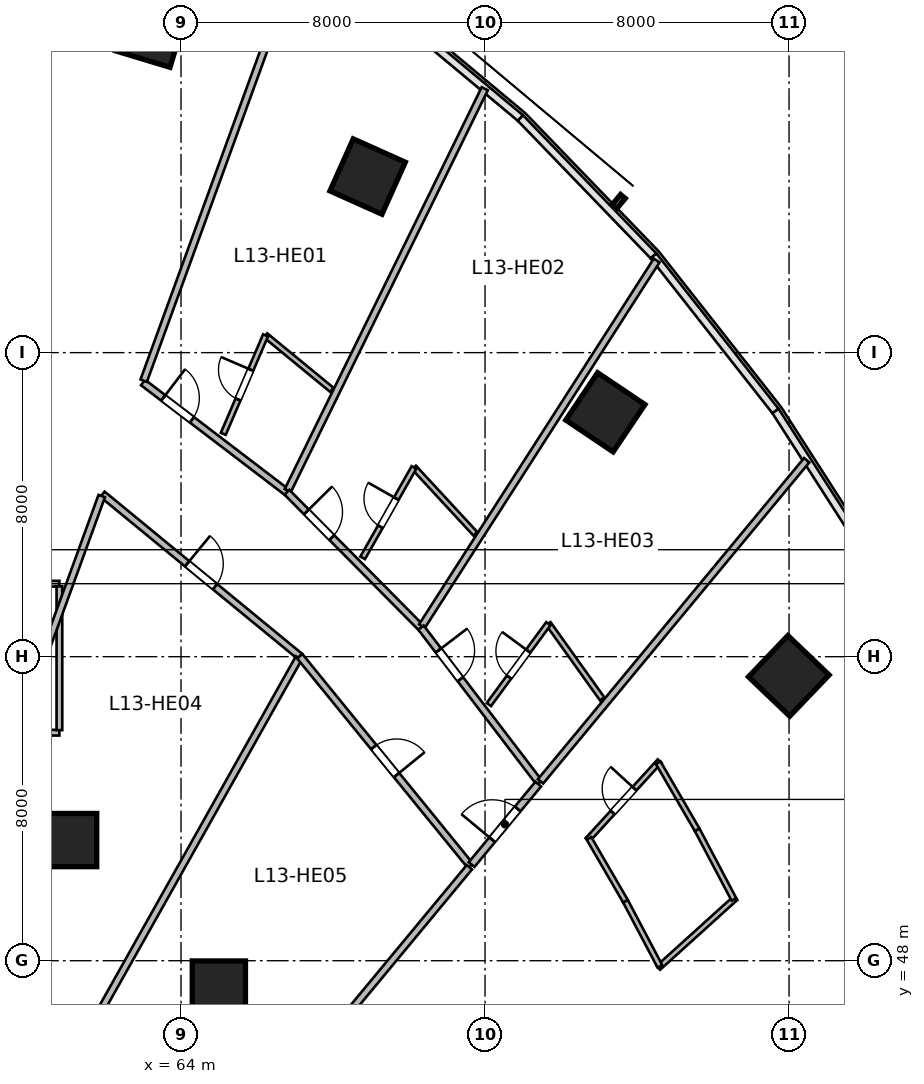
"""IFC4 building model, lengths in metres.
Left out: names, types, materials, properties, quantities, classifications, styles, units other than length and angle.
Written with IfcOpenShell. Run it as: python <this file> out.ifc"""

import sys

from ifc_helpers import new_model, si_unit, direction, frame, frame_2d, origin, origin_2d, place, context, subcontext, project, spatial, rectangle, circle, extrude, source, transform, mapped, element, fill, save


model = new_model("IFC4")
c1 = context("Model", 3, precision=1e-05, world=origin(), true_north=direction((0.0, 1.0)))
c2 = subcontext(c1, "Body", "Model", "MODEL_VIEW")
j1 = project(units=[si_unit("LENGTHUNIT", "METRE"), si_unit("PLANEANGLEUNIT", "RADIAN")], contexts=[c1])
p1 = place(None, origin())
s1 = spatial("IfcSite", under=j1, at=p1, CompositionType="ELEMENT")
p2 = place(p1, origin())
s2 = spatial("IfcBuilding", under=s1, at=p2, CompositionType="ELEMENT")
p3 = place(p2, frame((0.0, 0.0, 60.6)))
s3 = spatial("IfcBuildingStorey", under=s2, at=p3, CompositionType="ELEMENT", Elevation=60.6)
m1 = source(origin(), c2, "Body", "SweptSolid", [
    extrude(rectangle(XDim=1.5, YDim=1.5, at=origin_2d()), origin(), (0.0, 0.0, 1.0), 3.6),
])
p4 = place(p3, frame((63.209, 72.442, 0.0), z_axis=(0.0, 0.0, 1.0), x_axis=(0.288697611798, 0.957420330337, 0.0)))
e1 = element("IfcColumn", 1, at=p4, inside=s3, PredefinedType="COLUMN", context=c2, shape_type="MappedRepresentation", body=[
    mapped(m1, transform((0.0, 0.0, 0.0), scale=1.0)),
])
m2 = source(origin(), c2, "Body", "SweptSolid", [
    extrude(circle(Radius=0.7, at=origin_2d()), origin(), (0.0, 0.0, 1.0), 3.6),
])
p5 = place(p3, frame((61.082, 51.175, 0.0), z_axis=(0.0, 0.0, 1.0), x_axis=(0.409126902895, 0.912477494148, 0.0)))
e2 = element("IfcColumn", 2, at=p5, inside=s3, PredefinedType="COLUMN", context=c2, shape_type="MappedRepresentation", body=[
    mapped(m2, transform((0.0, 0.0, 0.0), scale=1.0)),
])
p6 = place(p3, frame((68.91, 68.633, 0.0), z_axis=(0.0, 0.0, 1.0), x_axis=(0.409126902895, 0.912477494148, 0.0)))
e3 = element("IfcColumn", 3, at=p6, inside=s3, PredefinedType="COLUMN", context=c2, shape_type="MappedRepresentation", body=[
    mapped(m1, transform((0.0, 0.0, 0.0), scale=1.0)),
])
p7 = place(p3, frame((64.996, 47.294, 0.0), z_axis=(0.0, 0.0, 1.0), x_axis=(0.55774510898, 0.830012285095, 0.0)))
e4 = element("IfcColumn", 4, at=p7, inside=s3, PredefinedType="COLUMN", context=c2, shape_type="MappedRepresentation", body=[
    mapped(m2, transform((0.0, 0.0, 0.0), scale=1.0)),
])
for number, where, z_axis, x_axis in (
    (5, (75.167, 62.43, 0.0), (0.0, 0.0, 1.0), (0.558, 0.83, 0.0)),
    (6, (79.993, 55.494, 0.0), (0.0, 0.0, 1.0), (0.691, 0.723, 0.0)),
):
    element("IfcColumn", number, at=place(p3, frame(where, z_axis=z_axis, x_axis=x_axis)), inside=s3, PredefinedType="COLUMN", context=c2, shape_type="MappedRepresentation", body=[
        mapped(m1, transform((0.0, 0.0, 0.0), scale=1.0)),
    ])
m3 = source(origin(), c2, "Body", "SweptSolid", [
    extrude(rectangle(XDim=6.6, YDim=0.15, at=frame_2d((3.3, 0.0))), origin(), (0.0, 0.0, 1.0), 2.803),
])
p8 = place(p3, frame((54.2, 54.0, 0.0), z_axis=(0.0, 0.0, 1.0), x_axis=(1.0, 0.0, 0.0)))
e7 = element("IfcWall", 7, at=p8, inside=s3, PredefinedType="PARTITIONING", context=c2, shape_type="MappedRepresentation", body=[
    mapped(m3, transform((0.0, 0.0, 0.0), scale=1.0)),
])
m4 = source(origin(), c2, "Body", "SweptSolid", [
    extrude(rectangle(XDim=6.6, YDim=0.15, at=frame_2d((3.3, 0.0))), origin(), (0.0, 0.0, 1.0), 3.36),
])
p9 = place(p3, frame((54.2, 57.92, 0.0), z_axis=(0.0, 0.0, 1.0), x_axis=(1.0, 0.0, 0.0)))
e8 = element("IfcWall", 8, at=p9, inside=s3, PredefinedType="PARTITIONING", context=c2, shape_type="MappedRepresentation", body=[
    mapped(m4, transform((0.0, 0.0, 0.0), scale=1.0)),
])
p10 = place(p9, frame((2.825, 0.0, 0.0)))
e9 = element("IfcOpeningElement", 9, at=p10, cuts=e8, PredefinedType="OPENING", context=c2, shape_type="SweptSolid", body=[
    extrude(rectangle(XDim=0.95, YDim=2.1, at=frame_2d((0.475, 1.05))), frame((0.0, 0.085, 0.0), z_axis=(0.0, -1.0, 0.0), x_axis=(1.0, 0.0, 0.0)), (0.0, 0.0, 1.0), 0.17),
])
m5 = source(origin(), c2, "Body", "SweptSolid", [
    extrude(rectangle(XDim=3.785, YDim=0.15, at=frame_2d((1.893, 0.0))), origin(), (0.0, 0.0, 1.0), 3.36),
])
p11 = place(p3, frame((60.8, 54.067, 0.0), z_axis=(0.0, 0.0, 1.0), x_axis=(0.0, 1.0, 0.0)))
e10 = element("IfcWall", 10, at=p11, inside=s3, PredefinedType="PARTITIONING", context=c2, shape_type="MappedRepresentation", body=[
    mapped(m5, transform((0.0, 0.0, 0.0), scale=1.0)),
])
m6 = source(origin(), c2, "Body", "SweptSolid", [
    extrude(rectangle(XDim=4.762, YDim=0.18, at=frame_2d((2.381, 0.0))), origin(), (0.0, 0.0, 1.0), 3.36),
])
p12 = place(p3, frame((63.001, 63.214, 0.0), z_axis=(0.0, 0.0, 1.0), x_axis=(0.795070295872, -0.60651729128, 0.0)))
e11 = element("IfcWall", 11, at=p12, inside=s3, PredefinedType="PLUMBINGWALL", context=c2, shape_type="MappedRepresentation", body=[
    mapped(m6, transform((0.0, 0.0, 0.0), scale=1.0)),
])
p13 = place(p12, frame((0.668, 0.0, 0.0)))
e12 = element("IfcOpeningElement", 12, at=p13, cuts=e11, PredefinedType="OPENING", context=c2, shape_type="SweptSolid", body=[
    extrude(rectangle(XDim=0.95, YDim=2.15, at=frame_2d((0.475, 1.075))), frame((0.0, 0.1, 0.0), z_axis=(0.0, -1.0, 0.0), x_axis=(1.0, 0.0, 0.0)), (0.0, 0.0, 1.0), 0.2),
])
m7 = source(origin(), c2, "Body", "SweptSolid", [
    extrude(rectangle(XDim=12.088, YDim=0.18, at=frame_2d((6.044, 0.0))), origin(), (0.0, 0.0, 1.0), 3.36),
])
p14 = place(p3, frame((63.019, 63.262, 0.0), z_axis=(0.0, 0.0, 1.0), x_axis=(0.34203007529, 0.939689005787, 0.0)))
e13 = element("IfcWall", 13, at=p14, inside=s3, PredefinedType="PLUMBINGWALL", context=c2, shape_type="MappedRepresentation", body=[
    mapped(m7, transform((0.0, 0.0, 0.0), scale=1.0)),
])
m8 = source(origin(), c2, "Body", "SweptSolid", [
    extrude(rectangle(XDim=11.775, YDim=0.18, at=frame_2d((5.887, 0.0))), origin(), (0.0, 0.0, 1.0), 3.36),
])
p15 = place(p3, frame((66.81, 60.371, 0.0), z_axis=(0.0, 0.0, 1.0), x_axis=(0.4401500056, 0.897924257702, 0.0)))
e14 = element("IfcWall", 14, at=p15, inside=s3, PredefinedType="PLUMBINGWALL", context=c2, shape_type="MappedRepresentation", body=[
    mapped(m8, transform((0.0, 0.0, 0.0), scale=1.0)),
])
m9 = source(origin(), c2, "Body", "SweptSolid", [
    extrude(rectangle(XDim=2.26, YDim=0.14, at=frame_2d((1.13, 0.0))), origin(), (0.0, 0.0, 1.0), 3.36),
])
p16 = place(p3, frame((66.224, 64.455, 0.0), z_axis=(0.0, 0.0, 1.0), x_axis=(0.772646789219, -0.634836151388, 0.0)))
e15 = element("IfcWall", 15, at=p16, inside=s3, PredefinedType="PARTITIONING", context=c2, shape_type="MappedRepresentation", body=[
    mapped(m9, transform((0.0, 0.0, 0.0), scale=1.0)),
])
m10 = source(origin(), c2, "Body", "SweptSolid", [
    extrude(rectangle(XDim=2.819, YDim=0.14, at=frame_2d((1.409, 0.0))), origin(), (0.0, 0.0, 1.0), 3.36),
])
p17 = place(p3, frame((65.112, 61.864, 0.0), z_axis=(0.0, 0.0, 1.0), x_axis=(0.394420979357, 0.918929861874, 0.0)))
e16 = element("IfcWall", 16, at=p17, inside=s3, PredefinedType="PARTITIONING", context=c2, shape_type="MappedRepresentation", body=[
    mapped(m10, transform((0.0, 0.0, 0.0), scale=1.0)),
])
p18 = place(p17, frame((0.984, 0.0, 0.0)))
e17 = element("IfcOpeningElement", 17, at=p18, cuts=e16, PredefinedType="OPENING", context=c2, shape_type="SweptSolid", body=[
    extrude(rectangle(XDim=0.85, YDim=2.05, at=frame_2d((0.425, 1.025))), frame((0.0, 0.08, 0.0), z_axis=(0.0, -1.0, 0.0), x_axis=(1.0, 0.0, 0.0)), (0.0, 0.0, 1.0), 0.16),
])
m11 = source(origin(), c2, "Body", "SweptSolid", [
    extrude(rectangle(XDim=5.012, YDim=0.18, at=frame_2d((2.506, 0.0))), origin(), (0.0, 0.0, 1.0), 3.36),
])
p19 = place(p3, frame((66.788, 60.326, 0.0), z_axis=(0.0, 0.0, 1.0), x_axis=(0.703664626435, -0.710532260707, 0.0)))
e18 = element("IfcWall", 18, at=p19, inside=s3, PredefinedType="PLUMBINGWALL", context=c2, shape_type="MappedRepresentation", body=[
    mapped(m11, transform((0.0, 0.0, 0.0), scale=1.0)),
])
p20 = place(p19, frame((0.728, 0.0, 0.0)))
e19 = element("IfcOpeningElement", 19, at=p20, cuts=e18, PredefinedType="OPENING", context=c2, shape_type="SweptSolid", body=[
    extrude(rectangle(XDim=0.95, YDim=2.15, at=frame_2d((0.475, 1.075))), frame((0.0, 0.1, 0.0), z_axis=(0.0, -1.0, 0.0), x_axis=(1.0, 0.0, 0.0)), (0.0, 0.0, 1.0), 0.2),
])
m12 = source(origin(), c2, "Body", "SweptSolid", [
    extrude(rectangle(XDim=11.432, YDim=0.18, at=frame_2d((5.716, 0.0))), origin(), (0.0, 0.0, 1.0), 3.36),
])
p21 = place(p3, frame((70.341, 56.805, 0.0), z_axis=(0.0, 0.0, 1.0), x_axis=(0.540196183124, 0.841539115988, 0.0)))
e20 = element("IfcWall", 20, at=p21, inside=s3, PredefinedType="PLUMBINGWALL", context=c2, shape_type="MappedRepresentation", body=[
    mapped(m12, transform((0.0, 0.0, 0.0), scale=1.0)),
])
m13 = source(origin(), c2, "Body", "SweptSolid", [
    extrude(rectangle(XDim=2.38, YDim=0.14, at=frame_2d((1.19, 0.0))), origin(), (0.0, 0.0, 1.0), 3.36),
])
p22 = place(p3, frame((70.131, 60.979, 0.0), z_axis=(0.0, 0.0, 1.0), x_axis=(0.679084816758, -0.734059814762, 0.0)))
e21 = element("IfcWall", 21, at=p22, inside=s3, PredefinedType="PARTITIONING", context=c2, shape_type="MappedRepresentation", body=[
    mapped(m13, transform((0.0, 0.0, 0.0), scale=1.0)),
])
m14 = source(origin(), c2, "Body", "SweptSolid", [
    extrude(rectangle(XDim=2.735, YDim=0.14, at=frame_2d((1.367, 0.0))), origin(), (0.0, 0.0, 1.0), 3.36),
])
p23 = place(p3, frame((68.781, 58.6, 0.0), z_axis=(0.0, 0.0, 1.0), x_axis=(0.493694940578, 0.869635156631, 0.0)))
e22 = element("IfcWall", 22, at=p23, inside=s3, PredefinedType="PARTITIONING", context=c2, shape_type="MappedRepresentation", body=[
    mapped(m14, transform((0.0, 0.0, 0.0), scale=1.0)),
])
p24 = place(p23, frame((0.942, 0.0, 0.0)))
e23 = element("IfcOpeningElement", 23, at=p24, cuts=e22, PredefinedType="OPENING", context=c2, shape_type="SweptSolid", body=[
    extrude(rectangle(XDim=0.85, YDim=2.05, at=frame_2d((0.425, 1.025))), frame((0.0, 0.08, 0.0), z_axis=(0.0, -1.0, 0.0), x_axis=(1.0, 0.0, 0.0)), (0.0, 0.0, 1.0), 0.16),
])
m15 = source(origin(), c2, "Body", "SweptSolid", [
    extrude(rectangle(XDim=5.135, YDim=0.18, at=frame_2d((2.567, 0.0))), origin(), (0.0, 0.0, 1.0), 3.36),
])
p25 = place(p3, frame((70.315, 56.764, 0.0), z_axis=(0.0, 0.0, 1.0), x_axis=(0.606802199649, -0.794852873494, 0.0)))
e24 = element("IfcWall", 24, at=p25, inside=s3, PredefinedType="PLUMBINGWALL", context=c2, shape_type="MappedRepresentation", body=[
    mapped(m15, transform((0.0, 0.0, 0.0), scale=1.0)),
])
p26 = place(p25, frame((0.757, 0.0, 0.0)))
e25 = element("IfcOpeningElement", 25, at=p26, cuts=e24, PredefinedType="OPENING", context=c2, shape_type="SweptSolid", body=[
    extrude(rectangle(XDim=0.95, YDim=2.15, at=frame_2d((0.475, 1.075))), frame((0.0, 0.1, 0.0), z_axis=(0.0, -1.0, 0.0), x_axis=(1.0, 0.0, 0.0)), (0.0, 0.0, 1.0), 0.2),
])
m16 = source(origin(), c2, "Body", "SweptSolid", [
    extrude(rectangle(XDim=10.975, YDim=0.18, at=frame_2d((5.487, 0.0))), origin(), (0.0, 0.0, 1.0), 3.36),
])
p27 = place(p3, frame((73.46, 52.719, 0.0), z_axis=(0.0, 0.0, 1.0), x_axis=(0.638125265812, 0.769932558821, 0.0)))
e26 = element("IfcWall", 26, at=p27, inside=s3, PredefinedType="PLUMBINGWALL", context=c2, shape_type="MappedRepresentation", body=[
    mapped(m16, transform((0.0, 0.0, 0.0), scale=1.0)),
])
m17 = source(origin(), c2, "Body", "SweptSolid", [
    extrude(rectangle(XDim=2.437, YDim=0.14, at=frame_2d((1.218, 0.0))), origin(), (0.0, 0.0, 1.0), 3.36),
])
p28 = place(p3, frame((73.667, 56.868, 0.0), z_axis=(0.0, 0.0, 1.0), x_axis=(0.581797219134, -0.813333877204, 0.0)))
e27 = element("IfcWall", 27, at=p28, inside=s3, PredefinedType="PARTITIONING", context=c2, shape_type="MappedRepresentation", body=[
    mapped(m17, transform((0.0, 0.0, 0.0), scale=1.0)),
])
m18 = source(origin(), c2, "Body", "SweptSolid", [
    extrude(rectangle(XDim=2.642, YDim=0.14, at=frame_2d((1.321, 0.0))), origin(), (0.0, 0.0, 1.0), 3.36),
])
p29 = place(p3, frame((72.101, 54.741, 0.0), z_axis=(0.0, 0.0, 1.0), x_axis=(0.592789122423, 0.805357719487, 0.0)))
e28 = element("IfcWall", 28, at=p29, inside=s3, PredefinedType="PARTITIONING", context=c2, shape_type="MappedRepresentation", body=[
    mapped(m18, transform((0.0, 0.0, 0.0), scale=1.0)),
])
p30 = place(p29, frame((0.896, 0.0, 0.0)))
e29 = element("IfcOpeningElement", 29, at=p30, cuts=e28, PredefinedType="OPENING", context=c2, shape_type="SweptSolid", body=[
    extrude(rectangle(XDim=0.85, YDim=2.05, at=frame_2d((0.425, 1.025))), frame((0.0, 0.08, 0.0), z_axis=(0.0, -1.0, 0.0), x_axis=(1.0, 0.0, 0.0)), (0.0, 0.0, 1.0), 0.16),
])
m19 = source(origin(), c2, "Body", "SweptSolid", [
    extrude(rectangle(XDim=6.721, YDim=0.18, at=frame_2d((3.361, 0.0))), origin(), (0.0, 0.0, 1.0), 3.36),
])
p31 = place(p3, frame((61.931, 60.275, 0.0), z_axis=(0.0, 0.0, 1.0), x_axis=(0.772828051199, -0.63461547671, 0.0)))
e30 = element("IfcWall", 30, at=p31, inside=s3, PredefinedType="PLUMBINGWALL", context=c2, shape_type="MappedRepresentation", body=[
    mapped(m19, transform((0.0, 0.0, 0.0), scale=1.0)),
])
p32 = place(p31, frame((2.885, 0.0, 0.0)))
e31 = element("IfcOpeningElement", 31, at=p32, cuts=e30, PredefinedType="OPENING", context=c2, shape_type="SweptSolid", body=[
    extrude(rectangle(XDim=0.95, YDim=2.15, at=frame_2d((0.475, 1.075))), frame((0.0, 0.1, 0.0), z_axis=(0.0, -1.0, 0.0), x_axis=(1.0, 0.0, 0.0)), (0.0, 0.0, 1.0), 0.2),
])
m20 = source(origin(), c2, "Body", "SweptSolid", [
    extrude(rectangle(XDim=12.196, YDim=0.18, at=frame_2d((6.098, 0.0))), origin(), (0.0, 0.0, 1.0), 3.36),
])
p33 = place(p3, frame((57.742, 48.766, 0.0), z_axis=(0.0, 0.0, 1.0), x_axis=(0.342022711534, 0.939691686031, 0.0)))
e32 = element("IfcWall", 32, at=p33, inside=s3, PredefinedType="PLUMBINGWALL", context=c2, shape_type="MappedRepresentation", body=[
    mapped(m20, transform((0.0, 0.0, 0.0), scale=1.0)),
])
m21 = source(origin(), c2, "Body", "SweptSolid", [
    extrude(rectangle(XDim=11.67, YDim=0.18, at=frame_2d((5.835, 0.0))), origin(), (0.0, 0.0, 1.0), 3.36),
])
p34 = place(p3, frame((61.381, 45.795, 0.0), z_axis=(0.0, 0.0, 1.0), x_axis=(0.490156946222, 0.871634193954, 0.0)))
e33 = element("IfcWall", 33, at=p34, inside=s3, PredefinedType="PLUMBINGWALL", context=c2, shape_type="MappedRepresentation", body=[
    mapped(m21, transform((0.0, 0.0, 0.0), scale=1.0)),
])
m22 = source(origin(), c2, "Body", "SweptSolid", [
    extrude(rectangle(XDim=7.113, YDim=0.18, at=frame_2d((3.556, 0.0))), origin(), (0.0, 0.0, 1.0), 3.36),
])
p35 = place(p3, frame((67.126, 56.01, 0.0), z_axis=(0.0, 0.0, 1.0), x_axis=(0.63149032532, -0.775383755974, 0.0)))
e34 = element("IfcWall", 34, at=p35, inside=s3, PredefinedType="PLUMBINGWALL", context=c2, shape_type="MappedRepresentation", body=[
    mapped(m22, transform((0.0, 0.0, 0.0), scale=1.0)),
])
p36 = place(p35, frame((3.081, 0.0, 0.0)))
e35 = element("IfcOpeningElement", 35, at=p36, cuts=e34, PredefinedType="OPENING", context=c2, shape_type="SweptSolid", body=[
    extrude(rectangle(XDim=0.95, YDim=2.15, at=frame_2d((0.475, 1.075))), frame((0.0, 0.1, 0.0), z_axis=(0.0, -1.0, 0.0), x_axis=(1.0, 0.0, 0.0)), (0.0, 0.0, 1.0), 0.2),
])
m23 = source(origin(), c2, "Body", "SweptSolid", [
    extrude(rectangle(XDim=11.053, YDim=0.18, at=frame_2d((5.527, 0.0))), origin(), (0.0, 0.0, 1.0), 3.36),
])
p37 = place(p3, frame((64.534, 41.949, 0.0), z_axis=(0.0, 0.0, 1.0), x_axis=(0.638131235571, 0.769927611005, 0.0)))
e36 = element("IfcWall", 36, at=p37, inside=s3, PredefinedType="PLUMBINGWALL", context=c2, shape_type="MappedRepresentation", body=[
    mapped(m23, transform((0.0, 0.0, 0.0), scale=1.0)),
])
m24 = source(origin(), c2, "Body", "SweptSolid", [
    extrude(rectangle(XDim=2.748, YDim=0.195, at=frame_2d((1.374, 0.0))), origin(), (0.0, 0.0, 1.0), 3.36),
])
p38 = place(p3, frame((71.647, 50.531, 0.0), z_axis=(0.0, 0.0, 1.0), x_axis=(0.638111168284, 0.769944242729, 0.0)))
e37 = element("IfcWall", 37, at=p38, inside=s3, PredefinedType="PARTITIONING", context=c2, shape_type="MappedRepresentation", body=[
    mapped(m24, transform((0.0, 0.0, 0.0), scale=1.0)),
])
p39 = place(p38, frame((0.849, 0.0, 0.0)))
e38 = element("IfcOpeningElement", 38, at=p39, cuts=e37, PredefinedType="OPENING", context=c2, shape_type="SweptSolid", body=[
    extrude(rectangle(XDim=1.05, YDim=2.15, at=frame_2d((0.525, 1.075))), frame((0.0, 0.107, 0.0), z_axis=(0.0, -1.0, 0.0), x_axis=(1.0, 0.0, 0.0)), (0.0, 0.0, 1.0), 0.215),
])
m25 = source(origin(), c2, "Body", "SweptSolid", [
    extrude(rectangle(XDim=2.812, YDim=0.14, at=frame_2d((1.406, 0.0))), origin(), (0.0, 0.0, 1.0), 3.36),
])
p40 = place(p3, frame((74.697, 51.177, 0.0), z_axis=(0.0, 0.0, 1.0), x_axis=(0.675119025852, 0.737708818527, 0.0)))
e39 = element("IfcWall", 39, at=p40, inside=s3, PredefinedType="PARTITIONING", context=c2, shape_type="MappedRepresentation", body=[
    mapped(m25, transform((0.0, 0.0, 0.0), scale=1.0)),
])
p41 = place(p40, frame((0.981, 0.0, 0.0)))
e40 = element("IfcOpeningElement", 40, at=p41, cuts=e39, PredefinedType="OPENING", context=c2, shape_type="SweptSolid", body=[
    extrude(rectangle(XDim=0.85, YDim=2.05, at=frame_2d((0.425, 1.025))), frame((0.0, 0.08, 0.0), z_axis=(0.0, -1.0, 0.0), x_axis=(1.0, 0.0, 0.0)), (0.0, 0.0, 1.0), 0.16),
])
m26 = source(origin(), c2, "Body", "SweptSolid", [
    extrude(rectangle(XDim=2.738, YDim=0.14, at=frame_2d((1.369, 0.0))), origin(), (0.0, 0.0, 1.0), 3.36),
])
p42 = place(p3, frame((76.56, 47.814, 0.0), z_axis=(0.0, 0.0, 1.0), x_axis=(0.741873676582, 0.670539669218, 0.0)))
e41 = element("IfcWall", 41, at=p42, inside=s3, PredefinedType="PARTITIONING", context=c2, shape_type="MappedRepresentation", body=[
    mapped(m26, transform((0.0, 0.0, 0.0), scale=1.0)),
])
m27 = source(origin(), c2, "Body", "SweptSolid", [
    extrude(rectangle(XDim=1.914, YDim=0.14, at=frame_2d((0.957, 0.0))), origin(), (0.0, 0.0, 1.0), 3.36),
])
p43 = place(p3, frame((74.736, 51.219, 0.0), z_axis=(0.0, 0.0, 1.0), x_axis=(0.502347790612, -0.864665656347, 0.0)))
e42 = element("IfcWall", 42, at=p43, inside=s3, PredefinedType="PARTITIONING", context=c2, shape_type="MappedRepresentation", body=[
    mapped(m27, transform((0.0, 0.0, 0.0), scale=1.0)),
])
m28 = source(origin(), c2, "Body", "SweptSolid", [
    extrude(rectangle(XDim=2.045, YDim=0.14, at=frame_2d((1.022, 0.0))), origin(), (0.0, 0.0, 1.0), 3.36),
])
p44 = place(p3, frame((76.557, 53.209, 0.0), z_axis=(0.0, 0.0, 1.0), x_axis=(0.5023112139, -0.864686905411, 0.0)))
e43 = element("IfcWall", 43, at=p44, inside=s3, PredefinedType="PARTITIONING", context=c2, shape_type="MappedRepresentation", body=[
    mapped(m28, transform((0.0, 0.0, 0.0), scale=1.0)),
])
m29 = source(origin(), c2, "Body", "SweptSolid", [
    extrude(rectangle(XDim=1.936, YDim=0.14, at=frame_2d((0.968, 0.0))), origin(), (0.0, 0.0, 1.0), 3.36),
])
p45 = place(p3, frame((75.697, 49.563, 0.0), z_axis=(0.0, 0.0, 1.0), x_axis=(0.467174971862, -0.884164886017, 0.0)))
e44 = element("IfcWall", 44, at=p45, inside=s3, PredefinedType="PARTITIONING", context=c2, shape_type="MappedRepresentation", body=[
    mapped(m29, transform((0.0, 0.0, 0.0), scale=1.0)),
])
m30 = source(origin(), c2, "Body", "SweptSolid", [
    extrude(rectangle(XDim=2.068, YDim=0.14, at=frame_2d((1.034, 0.0))), origin(), (0.0, 0.0, 1.0), 3.36),
])
p46 = place(p3, frame((77.584, 51.441, 0.0), z_axis=(0.0, 0.0, 1.0), x_axis=(0.467215057643, -0.884143704333, 0.0)))
e45 = element("IfcWall", 45, at=p46, inside=s3, PredefinedType="PARTITIONING", context=c2, shape_type="MappedRepresentation", body=[
    mapped(m30, transform((0.0, 0.0, 0.0), scale=1.0)),
])
m31 = source(origin(), c2, "Body", "SweptSolid", [
    extrude(rectangle(XDim=0.95, YDim=2.15, at=frame_2d((0.475, 1.075))), frame((0.0, 0.025, 0.0), z_axis=(0.0, -1.0, 0.0), x_axis=(1.0, 0.0, 0.0)), (0.0, 0.0, 1.0), 0.05),
])
p47 = place(p13, origin())
e46 = element("IfcDoor", 46, at=p47, inside=s3, OperationType="SINGLE_SWING_LEFT", PredefinedType="DOOR", context=c2, shape_type="MappedRepresentation", body=[
    mapped(m31, transform((0.0, 0.0, 0.0), scale=1.0)),
])
fill(e12, e46)
m32 = source(origin(), c2, "Body", "SweptSolid", [
    extrude(rectangle(XDim=0.85, YDim=2.05, at=frame_2d((0.425, 1.025))), frame((0.0, 0.025, 0.0), z_axis=(0.0, -1.0, 0.0), x_axis=(1.0, 0.0, 0.0)), (0.0, 0.0, 1.0), 0.05),
])
p48 = place(p18, origin())
e47 = element("IfcDoor", 47, at=p48, inside=s3, OperationType="SINGLE_SWING_RIGHT", PredefinedType="DOOR", context=c2, shape_type="MappedRepresentation", body=[
    mapped(m32, transform((0.0, 0.0, 0.0), scale=1.0)),
])
fill(e17, e47)
p49 = place(p20, origin())
e48 = element("IfcDoor", 48, at=p49, inside=s3, OperationType="SINGLE_SWING_LEFT", PredefinedType="DOOR", context=c2, shape_type="MappedRepresentation", body=[
    mapped(m31, transform((0.0, 0.0, 0.0), scale=1.0)),
])
fill(e19, e48)
p50 = place(p24, origin())
e49 = element("IfcDoor", 49, at=p50, inside=s3, OperationType="SINGLE_SWING_RIGHT", PredefinedType="DOOR", context=c2, shape_type="MappedRepresentation", body=[
    mapped(m32, transform((0.0, 0.0, 0.0), scale=1.0)),
])
fill(e23, e49)
p51 = place(p26, origin())
e50 = element("IfcDoor", 50, at=p51, inside=s3, OperationType="SINGLE_SWING_LEFT", PredefinedType="DOOR", context=c2, shape_type="MappedRepresentation", body=[
    mapped(m31, transform((0.0, 0.0, 0.0), scale=1.0)),
])
fill(e25, e50)
p52 = place(p30, origin())
e51 = element("IfcDoor", 51, at=p52, inside=s3, OperationType="SINGLE_SWING_RIGHT", PredefinedType="DOOR", context=c2, shape_type="MappedRepresentation", body=[
    mapped(m32, transform((0.0, 0.0, 0.0), scale=1.0)),
])
fill(e29, e51)
p53 = place(p32, origin())
e52 = element("IfcDoor", 52, at=p53, inside=s3, OperationType="SINGLE_SWING_LEFT", PredefinedType="DOOR", context=c2, shape_type="MappedRepresentation", body=[
    mapped(m31, transform((0.0, 0.0, 0.0), scale=1.0)),
])
fill(e31, e52)
p54 = place(p36, origin())
e53 = element("IfcDoor", 53, at=p54, inside=s3, OperationType="SINGLE_SWING_RIGHT", PredefinedType="DOOR", context=c2, shape_type="MappedRepresentation", body=[
    mapped(m31, transform((0.0, 0.0, 0.0), scale=1.0)),
])
fill(e35, e53)
m33 = source(origin(), c2, "Body", "SweptSolid", [
    extrude(rectangle(XDim=1.05, YDim=2.15, at=frame_2d((0.525, 1.075))), frame((0.0, 0.025, 0.0), z_axis=(0.0, -1.0, 0.0), x_axis=(1.0, 0.0, 0.0)), (0.0, 0.0, 1.0), 0.05),
])
p55 = place(p39, origin())
e54 = element("IfcDoor", 54, at=p55, inside=s3, OperationType="SINGLE_SWING_LEFT", PredefinedType="DOOR", context=c2, shape_type="MappedRepresentation", body=[
    mapped(m33, transform((0.0, 0.0, 0.0), scale=1.0)),
])
fill(e38, e54)
p56 = place(p41, origin())
e55 = element("IfcDoor", 55, at=p56, inside=s3, OperationType="SINGLE_SWING_RIGHT", PredefinedType="DOOR", context=c2, shape_type="MappedRepresentation", body=[
    mapped(m32, transform((0.0, 0.0, 0.0), scale=1.0)),
])
fill(e40, e55)
save(model, sys.argv[1])
